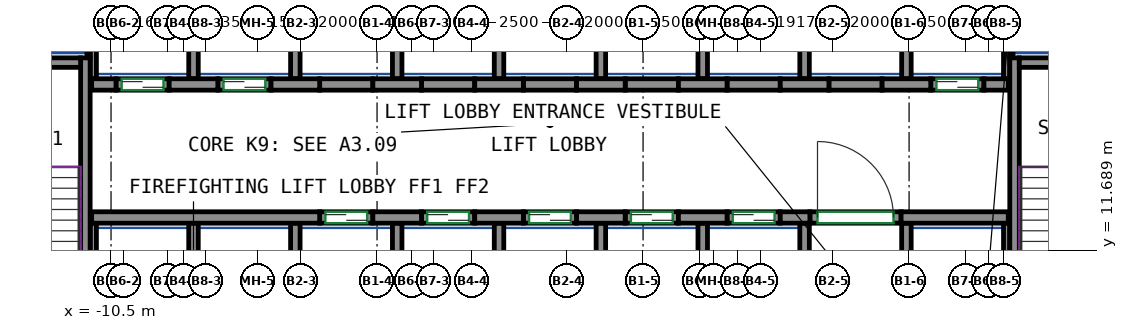
"""IFC4 building model, lengths in metres.
Left out: names, types, materials, properties, quantities, classifications, styles, units other than length and angle.
Written with IfcOpenShell. Run it as: python <this file> out.ifc"""

import sys

from ifc_helpers import new_model, si_unit, direction, frame, frame_2d, origin, place, context, subcontext, project, spatial, rectangle, extrude, source, transform, mapped, element, fill, save


model = new_model("IFC4")
c1 = context("Model", 3, precision=1e-05, world=origin(), true_north=direction((0.0, 1.0)))
c2 = subcontext(c1, "Body", "Model", "MODEL_VIEW")
j1 = project(units=[si_unit("LENGTHUNIT", "METRE"), si_unit("PLANEANGLEUNIT", "RADIAN")], contexts=[c1])
p1 = place(None, origin())
s1 = spatial("IfcSite", under=j1, at=p1, CompositionType="ELEMENT")
p2 = place(p1, origin())
s2 = spatial("IfcBuilding", under=s1, at=p2, CompositionType="ELEMENT")
p3 = place(p2, frame((0.0, 0.0, 39.0)))
s3 = spatial("IfcBuildingStorey", under=s2, at=p3, CompositionType="ELEMENT", Elevation=39.0)
m1 = source(origin(), c2, "Body", "SweptSolid", [
    extrude(rectangle(XDim=7.75, YDim=0.25, at=frame_2d((3.875, 0.0))), origin(), (0.0, 0.0, 1.0), 3.72),
])
p4 = place(p3, frame((-11.175, 9.0, 0.0), z_axis=(0.0, 0.0, 1.0), x_axis=(0.0, 1.0, 0.0)))
e1 = element("IfcWall", 1, at=p4, inside=s3, PredefinedType="SHEAR", context=c2, shape_type="MappedRepresentation", body=[
    mapped(m1, transform((0.0, 0.0, 0.0))),
])
m2 = source(origin(), c2, "Body", "SweptSolid", [
    extrude(rectangle(XDim=3.7, YDim=0.25, at=frame_2d((1.85, 0.0))), origin(), (0.0, 0.0, 1.0), 3.72),
])
p5 = place(p3, frame((-15.0, 16.625, 0.0), z_axis=(0.0, 0.0, 1.0), x_axis=(1.0, 0.0, 0.0)))
e2 = element("IfcWall", 2, at=p5, inside=s3, PredefinedType="SHEAR", context=c2, shape_type="MappedRepresentation", body=[
    mapped(m2, transform((0.0, 0.0, 0.0))),
])
p6 = place(p3, frame((13.275, 9.0, 0.0), z_axis=(0.0, 0.0, 1.0), x_axis=(0.0, 1.0, 0.0)))
e3 = element("IfcWall", 3, at=p6, inside=s3, PredefinedType="SHEAR", context=c2, shape_type="MappedRepresentation", body=[
    mapped(m1, transform((0.0, 0.0, 0.0))),
])
m3 = source(origin(), c2, "Body", "SweptSolid", [
    extrude(rectangle(XDim=3.7, YDim=0.25, at=frame_2d((1.85, 0.0))), origin(), (0.0, 0.0, 1.0), 3.72),
])
p7 = place(p3, frame((13.4, 16.625, 0.0), z_axis=(0.0, 0.0, 1.0), x_axis=(1.0, 0.0, 0.0)))
e4 = element("IfcWall", 4, at=p7, inside=s3, PredefinedType="SHEAR", context=c2, shape_type="MappedRepresentation", body=[
    mapped(m3, transform((0.0, 0.0, 0.0))),
])
m4 = source(origin(), c2, "Body", "SweptSolid", [
    extrude(rectangle(XDim=6.0, YDim=0.3, at=frame_2d((3.0, 0.0))), origin(), (0.0, 0.0, 1.0), 3.72),
])
p8 = place(p3, frame((-11.01, 12.55, 0.0), z_axis=(0.0, 0.0, 1.0), x_axis=(1.0, 0.0, 0.0)))
e5 = element("IfcWall", 5, at=p8, inside=s3, PredefinedType="SHEAR", context=c2, shape_type="MappedRepresentation", body=[
    mapped(m4, transform((0.0, 0.0, 0.0))),
])
m5 = source(origin(), c2, "Body", "SweptSolid", [
    extrude(rectangle(XDim=1.28, YDim=0.3, at=frame_2d((0.64, 0.0))), origin(), (0.0, 0.0, 1.0), 3.72),
])
for number, where, z_axis, x_axis in (
    (6, (-3.61, 12.55, 0.0), (0.0, 0.0, 1.0), (1.0, 0.0, 0.0)),
    (7, (-0.93, 12.55, 0.0), (0.0, 0.0, 1.0), (1.0, 0.0, 0.0)),
    (8, (1.75, 12.55, 0.0), (0.0, 0.0, 1.0), (1.0, 0.0, 0.0)),
    (9, (4.43, 12.55, 0.0), (0.0, 0.0, 1.0), (1.0, 0.0, 0.0)),
):
    element("IfcWall", number, at=place(p3, frame(where, z_axis=z_axis, x_axis=x_axis)), inside=s3, PredefinedType="SHEAR", context=c2, shape_type="MappedRepresentation", body=[
        mapped(m5, transform((0.0, 0.0, 0.0))),
    ])
m6 = source(origin(), c2, "Body", "SweptSolid", [
    extrude(rectangle(XDim=0.78, YDim=0.3, at=frame_2d((0.39, 0.0))), origin(), (0.0, 0.0, 1.0), 3.72),
])
p9 = place(p3, frame((7.11, 12.55, 0.0), z_axis=(0.0, 0.0, 1.0), x_axis=(1.0, 0.0, 0.0)))
e10 = element("IfcWall", 10, at=p9, inside=s3, PredefinedType="SHEAR", context=c2, shape_type="MappedRepresentation", body=[
    mapped(m6, transform((0.0, 0.0, 0.0))),
])
m7 = source(origin(), c2, "Body", "SweptSolid", [
    extrude(rectangle(XDim=2.82, YDim=0.3, at=frame_2d((1.41, 0.0))), origin(), (0.0, 0.0, 1.0), 3.72),
])
p10 = place(p3, frame((10.29, 12.55, 0.0), z_axis=(0.0, 0.0, 1.0), x_axis=(1.0, 0.0, 0.0)))
e11 = element("IfcWall", 11, at=p10, inside=s3, PredefinedType="SHEAR", context=c2, shape_type="MappedRepresentation", body=[
    mapped(m7, transform((0.0, 0.0, 0.0))),
])
m8 = source(origin(), c2, "Body", "SweptSolid", [
    extrude(rectangle(XDim=0.64, YDim=0.3, at=frame_2d((0.32, 0.0))), origin(), (0.0, 0.0, 1.0), 3.72),
])
p11 = place(p3, frame((-11.01, 16.05, 0.0), z_axis=(0.0, 0.0, 1.0), x_axis=(1.0, 0.0, 0.0)))
e12 = element("IfcWall", 12, at=p11, inside=s3, PredefinedType="SHEAR", context=c2, shape_type="MappedRepresentation", body=[
    mapped(m8, transform((0.0, 0.0, 0.0))),
])
for number, where, z_axis, x_axis in (
    (13, (-8.97, 16.05, 0.0), (0.0, 0.0, 1.0), (1.0, 0.0, 0.0)),
    (14, (-6.29, 16.05, 0.0), (0.0, 0.0, 1.0), (1.0, 0.0, 0.0)),
    (15, (-3.61, 16.05, 0.0), (0.0, 0.0, 1.0), (1.0, 0.0, 0.0)),
    (16, (-0.93, 16.05, 0.0), (0.0, 0.0, 1.0), (1.0, 0.0, 0.0)),
    (17, (1.75, 16.05, 0.0), (0.0, 0.0, 1.0), (1.0, 0.0, 0.0)),
    (18, (4.43, 16.05, 0.0), (0.0, 0.0, 1.0), (1.0, 0.0, 0.0)),
):
    element("IfcWall", number, at=place(p3, frame(where, z_axis=z_axis, x_axis=x_axis)), inside=s3, PredefinedType="SHEAR", context=c2, shape_type="MappedRepresentation", body=[
        mapped(m5, transform((0.0, 0.0, 0.0))),
    ])
m9 = source(origin(), c2, "Body", "SweptSolid", [
    extrude(rectangle(XDim=1.28, YDim=0.3, at=frame_2d((0.64, 0.0))), origin(), (0.0, 0.0, 1.0), 3.72),
])
p12 = place(p3, frame((7.11, 16.05, 0.0), z_axis=(0.0, 0.0, 1.0), x_axis=(1.0, 0.0, 0.0)))
e19 = element("IfcWall", 19, at=p12, inside=s3, PredefinedType="SHEAR", context=c2, shape_type="MappedRepresentation", body=[
    mapped(m9, transform((0.0, 0.0, 0.0))),
])
p13 = place(p3, frame((9.79, 16.05, 0.0), z_axis=(0.0, 0.0, 1.0), x_axis=(1.0, 0.0, 0.0)))
e20 = element("IfcWall", 20, at=p13, inside=s3, PredefinedType="SHEAR", context=c2, shape_type="MappedRepresentation", body=[
    mapped(m5, transform((0.0, 0.0, 0.0))),
])
m10 = source(origin(), c2, "Body", "SweptSolid", [
    extrude(rectangle(XDim=0.64, YDim=0.3, at=frame_2d((0.32, 0.0))), origin(), (0.0, 0.0, 1.0), 3.72),
])
p14 = place(p3, frame((12.47, 16.05, 0.0), z_axis=(0.0, 0.0, 1.0), x_axis=(1.0, 0.0, 0.0)))
e21 = element("IfcWall", 21, at=p14, inside=s3, PredefinedType="SHEAR", context=c2, shape_type="MappedRepresentation", body=[
    mapped(m10, transform((0.0, 0.0, 0.0))),
])
m11 = source(origin(), c2, "Body", "SweptSolid", [
    extrude(rectangle(XDim=1.4, YDim=0.3, at=frame_2d((0.7, 0.0))), origin(), (0.0, 0.0, 1.0), 3.72),
])
p15 = place(p3, frame((-5.01, 12.55, 0.0), z_axis=(0.0, 0.0, 1.0), x_axis=(1.0, 0.0, 0.0)))
e22 = element("IfcWall", 22, at=p15, inside=s3, PredefinedType="PARTITIONING", context=c2, shape_type="MappedRepresentation", body=[
    mapped(m11, transform((0.0, 0.0, 0.0))),
])
p16 = place(p15, frame((0.15, 0.0, 0.0)))
e23 = element("IfcOpeningElement", 23, at=p16, cuts=e22, PredefinedType="OPENING", context=c2, shape_type="SweptSolid", body=[
    extrude(rectangle(XDim=1.1, YDim=2.1, at=frame_2d((0.55, 1.05))), frame((0.0, 0.16, 0.0), z_axis=(0.0, -1.0, 0.0), x_axis=(1.0, 0.0, 0.0)), (0.0, 0.0, 1.0), 0.32),
])
m12 = source(origin(), c2, "Body", "SweptSolid", [
    extrude(rectangle(XDim=1.4, YDim=0.3, at=frame_2d((0.7, 0.0))), origin(), (0.0, 0.0, 1.0), 3.72),
])
p17 = place(p3, frame((-2.33, 12.55, 0.0), z_axis=(0.0, 0.0, 1.0), x_axis=(1.0, 0.0, 0.0)))
e24 = element("IfcWall", 24, at=p17, inside=s3, PredefinedType="PARTITIONING", context=c2, shape_type="MappedRepresentation", body=[
    mapped(m12, transform((0.0, 0.0, 0.0))),
])
p18 = place(p17, frame((0.15, 0.0, 0.0)))
e25 = element("IfcOpeningElement", 25, at=p18, cuts=e24, PredefinedType="OPENING", context=c2, shape_type="SweptSolid", body=[
    extrude(rectangle(XDim=1.1, YDim=2.1, at=frame_2d((0.55, 1.05))), frame((0.0, 0.16, 0.0), z_axis=(0.0, -1.0, 0.0), x_axis=(1.0, 0.0, 0.0)), (0.0, 0.0, 1.0), 0.32),
])
p19 = place(p3, frame((0.35, 12.55, 0.0), z_axis=(0.0, 0.0, 1.0), x_axis=(1.0, 0.0, 0.0)))
e26 = element("IfcWall", 26, at=p19, inside=s3, PredefinedType="PARTITIONING", context=c2, shape_type="MappedRepresentation", body=[
    mapped(m11, transform((0.0, 0.0, 0.0))),
])
p20 = place(p19, frame((0.15, 0.0, 0.0)))
e27 = element("IfcOpeningElement", 27, at=p20, cuts=e26, PredefinedType="OPENING", context=c2, shape_type="SweptSolid", body=[
    extrude(rectangle(XDim=1.1, YDim=2.1, at=frame_2d((0.55, 1.05))), frame((0.0, 0.16, 0.0), z_axis=(0.0, -1.0, 0.0), x_axis=(1.0, 0.0, 0.0)), (0.0, 0.0, 1.0), 0.32),
])
p21 = place(p3, frame((3.03, 12.55, 0.0), z_axis=(0.0, 0.0, 1.0), x_axis=(1.0, 0.0, 0.0)))
e28 = element("IfcWall", 28, at=p21, inside=s3, PredefinedType="PARTITIONING", context=c2, shape_type="MappedRepresentation", body=[
    mapped(m11, transform((0.0, 0.0, 0.0))),
])
p22 = place(p21, frame((0.15, 0.0, 0.0)))
e29 = element("IfcOpeningElement", 29, at=p22, cuts=e28, PredefinedType="OPENING", context=c2, shape_type="SweptSolid", body=[
    extrude(rectangle(XDim=1.1, YDim=2.1, at=frame_2d((0.55, 1.05))), frame((0.0, 0.16, 0.0), z_axis=(0.0, -1.0, 0.0), x_axis=(1.0, 0.0, 0.0)), (0.0, 0.0, 1.0), 0.32),
])
p23 = place(p3, frame((5.71, 12.55, 0.0), z_axis=(0.0, 0.0, 1.0), x_axis=(1.0, 0.0, 0.0)))
e30 = element("IfcWall", 30, at=p23, inside=s3, PredefinedType="PARTITIONING", context=c2, shape_type="MappedRepresentation", body=[
    mapped(m12, transform((0.0, 0.0, 0.0))),
])
p24 = place(p23, frame((0.15, 0.0, 0.0)))
e31 = element("IfcOpeningElement", 31, at=p24, cuts=e30, PredefinedType="OPENING", context=c2, shape_type="SweptSolid", body=[
    extrude(rectangle(XDim=1.1, YDim=2.1, at=frame_2d((0.55, 1.05))), frame((0.0, 0.16, 0.0), z_axis=(0.0, -1.0, 0.0), x_axis=(1.0, 0.0, 0.0)), (0.0, 0.0, 1.0), 0.32),
])
p25 = place(p3, frame((11.07, 16.05, 0.0), z_axis=(0.0, 0.0, 1.0), x_axis=(1.0, 0.0, 0.0)))
e32 = element("IfcWall", 32, at=p25, inside=s3, PredefinedType="PARTITIONING", context=c2, shape_type="MappedRepresentation", body=[
    mapped(m11, transform((0.0, 0.0, 0.0))),
])
p26 = place(p25, frame((0.15, 0.0, 0.0)))
e33 = element("IfcOpeningElement", 33, at=p26, cuts=e32, PredefinedType="OPENING", context=c2, shape_type="SweptSolid", body=[
    extrude(rectangle(XDim=1.1, YDim=2.1, at=frame_2d((0.55, 1.05))), frame((0.0, 0.16, 0.0), z_axis=(0.0, -1.0, 0.0), x_axis=(1.0, 0.0, 0.0)), (0.0, 0.0, 1.0), 0.32),
])
p27 = place(p3, frame((-10.37, 16.05, 0.0), z_axis=(0.0, 0.0, 1.0), x_axis=(1.0, 0.0, 0.0)))
e34 = element("IfcWall", 34, at=p27, inside=s3, PredefinedType="PARTITIONING", context=c2, shape_type="MappedRepresentation", body=[
    mapped(m12, transform((0.0, 0.0, 0.0))),
])
p28 = place(p27, frame((0.15, 0.0, 0.0)))
e35 = element("IfcOpeningElement", 35, at=p28, cuts=e34, PredefinedType="OPENING", context=c2, shape_type="SweptSolid", body=[
    extrude(rectangle(XDim=1.1, YDim=2.1, at=frame_2d((0.55, 1.05))), frame((0.0, 0.16, 0.0), z_axis=(0.0, -1.0, 0.0), x_axis=(1.0, 0.0, 0.0)), (0.0, 0.0, 1.0), 0.32),
])
p29 = place(p3, frame((-7.69, 16.05, 0.0), z_axis=(0.0, 0.0, 1.0), x_axis=(1.0, 0.0, 0.0)))
e36 = element("IfcWall", 36, at=p29, inside=s3, PredefinedType="PARTITIONING", context=c2, shape_type="MappedRepresentation", body=[
    mapped(m11, transform((0.0, 0.0, 0.0))),
])
p30 = place(p29, frame((0.15, 0.0, 0.0)))
e37 = element("IfcOpeningElement", 37, at=p30, cuts=e36, PredefinedType="OPENING", context=c2, shape_type="SweptSolid", body=[
    extrude(rectangle(XDim=1.1, YDim=2.1, at=frame_2d((0.55, 1.05))), frame((0.0, 0.16, 0.0), z_axis=(0.0, -1.0, 0.0), x_axis=(1.0, 0.0, 0.0)), (0.0, 0.0, 1.0), 0.32),
])
m13 = source(origin(), c2, "Body", "SweptSolid", [
    extrude(rectangle(XDim=2.4, YDim=0.3, at=frame_2d((1.2, 0.0))), origin(), (0.0, 0.0, 1.0), 3.72),
])
p31 = place(p3, frame((7.89, 12.55, 0.0), z_axis=(0.0, 0.0, 1.0), x_axis=(1.0, 0.0, 0.0)))
e38 = element("IfcWall", 38, at=p31, inside=s3, PredefinedType="PARTITIONING", context=c2, shape_type="MappedRepresentation", body=[
    mapped(m13, transform((0.0, 0.0, 0.0))),
])
p32 = place(p31, frame((0.2, 0.0, 0.0)))
e39 = element("IfcOpeningElement", 39, at=p32, cuts=e38, PredefinedType="OPENING", context=c2, shape_type="SweptSolid", body=[
    extrude(rectangle(XDim=2.0, YDim=2.1, at=frame_2d((1.0, 1.05))), frame((0.0, 0.16, 0.0), z_axis=(0.0, -1.0, 0.0), x_axis=(1.0, 0.0, 0.0)), (0.0, 0.0, 1.0), 0.32),
])
p33 = place(p3, frame((-5.01, 16.05, 0.0), z_axis=(0.0, 0.0, 1.0), x_axis=(1.0, 0.0, 0.0)))
e40 = element("IfcWall", 40, at=p33, inside=s3, PredefinedType="PARTITIONING", context=c2, shape_type="MappedRepresentation", body=[
    mapped(m11, transform((0.0, 0.0, 0.0))),
])
p34 = place(p3, frame((-2.33, 16.05, 0.0), z_axis=(0.0, 0.0, 1.0), x_axis=(1.0, 0.0, 0.0)))
e41 = element("IfcWall", 41, at=p34, inside=s3, PredefinedType="PARTITIONING", context=c2, shape_type="MappedRepresentation", body=[
    mapped(m12, transform((0.0, 0.0, 0.0))),
])
for number, where, z_axis, x_axis in (
    (42, (0.35, 16.05, 0.0), (0.0, 0.0, 1.0), (1.0, 0.0, 0.0)),
    (43, (3.03, 16.05, 0.0), (0.0, 0.0, 1.0), (1.0, 0.0, 0.0)),
):
    element("IfcWall", number, at=place(p3, frame(where, z_axis=z_axis, x_axis=x_axis)), inside=s3, PredefinedType="PARTITIONING", context=c2, shape_type="MappedRepresentation", body=[
        mapped(m11, transform((0.0, 0.0, 0.0))),
    ])
for number, where, z_axis, x_axis in (
    (44, (5.71, 16.05, 0.0), (0.0, 0.0, 1.0), (1.0, 0.0, 0.0)),
    (45, (8.39, 16.05, 0.0), (0.0, 0.0, 1.0), (1.0, 0.0, 0.0)),
):
    element("IfcWall", number, at=place(p3, frame(where, z_axis=z_axis, x_axis=x_axis)), inside=s3, PredefinedType="PARTITIONING", context=c2, shape_type="MappedRepresentation", body=[
        mapped(m12, transform((0.0, 0.0, 0.0))),
    ])
m14 = source(origin(), c2, "Body", "SweptSolid", [
    extrude(rectangle(XDim=3.275, YDim=0.165, at=frame_2d((1.638, 0.0))), origin(), (0.0, 0.0, 1.0), 3.72),
])
for number, where, z_axis, x_axis in (
    (46, (13.067, 16.2, 0.0), (0.0, 0.0, 1.0), (0.0, 1.0, 0.0)),
    (47, (-10.968, 16.2, 0.0), (0.0, 0.0, 1.0), (0.0, 1.0, 0.0)),
):
    element("IfcWall", number, at=place(p3, frame(where, z_axis=z_axis, x_axis=x_axis)), inside=s3, PredefinedType="PARTITIONING", context=c2, shape_type="MappedRepresentation", body=[
        mapped(m14, transform((0.0, 0.0, 0.0))),
    ])
m15 = source(origin(), c2, "Body", "SweptSolid", [
    extrude(rectangle(XDim=3.275, YDim=0.25, at=frame_2d((1.638, 0.0))), origin(), (0.0, 0.0, 1.0), 3.72),
])
p35 = place(p3, frame((10.43, 16.2, 0.0), z_axis=(0.0, 0.0, 1.0), x_axis=(0.0, 1.0, 0.0)))
e48 = element("IfcWall", 48, at=p35, inside=s3, PredefinedType="PARTITIONING", context=c2, shape_type="MappedRepresentation", body=[
    mapped(m15, transform((0.0, 0.0, 0.0))),
])
m16 = source(origin(), c2, "Body", "SweptSolid", [
    extrude(rectangle(XDim=2.725, YDim=0.085, at=frame_2d((1.363, 0.0))), origin(), (0.0, 0.0, 1.0), 3.72),
])
p36 = place(p3, frame((13.192, 16.75, 0.0), z_axis=(0.0, 0.0, 1.0), x_axis=(0.0, 1.0, 0.0)))
e49 = element("IfcWall", 49, at=p36, inside=s3, PredefinedType="PARTITIONING", context=c2, shape_type="MappedRepresentation", body=[
    mapped(m16, transform((0.0, 0.0, 0.0))),
])
for number, where, z_axis, x_axis in (
    (50, (2.39, 16.2, 0.0), (0.0, 0.0, 1.0), (0.0, 1.0, 0.0)),
    (51, (5.07, 16.2, 0.0), (0.0, 0.0, 1.0), (0.0, 1.0, 0.0)),
    (52, (7.75, 16.2, 0.0), (0.0, 0.0, 1.0), (0.0, 1.0, 0.0)),
    (53, (-0.29, 16.2, 0.0), (0.0, 0.0, 1.0), (0.0, 1.0, 0.0)),
):
    element("IfcWall", number, at=place(p3, frame(where, z_axis=z_axis, x_axis=x_axis)), inside=s3, PredefinedType="PARTITIONING", context=c2, shape_type="MappedRepresentation", body=[
        mapped(m15, transform((0.0, 0.0, 0.0))),
    ])
p37 = place(p3, frame((-11.093, 16.75, 0.0), z_axis=(0.0, 0.0, 1.0), x_axis=(0.0, 1.0, 0.0)))
e54 = element("IfcWall", 54, at=p37, inside=s3, PredefinedType="PARTITIONING", context=c2, shape_type="MappedRepresentation", body=[
    mapped(m16, transform((0.0, 0.0, 0.0))),
])
for number, where, z_axis, x_axis in (
    (55, (-2.97, 16.2, 0.0), (0.0, 0.0, 1.0), (0.0, 1.0, 0.0)),
    (56, (-5.65, 16.2, 0.0), (0.0, 0.0, 1.0), (0.0, 1.0, 0.0)),
    (57, (-8.33, 16.2, 0.0), (0.0, 0.0, 1.0), (0.0, 1.0, 0.0)),
):
    element("IfcWall", number, at=place(p3, frame(where, z_axis=z_axis, x_axis=x_axis)), inside=s3, PredefinedType="PARTITIONING", context=c2, shape_type="MappedRepresentation", body=[
        mapped(m15, transform((0.0, 0.0, 0.0))),
    ])
m17 = source(origin(), c2, "Body", "SweptSolid", [
    extrude(rectangle(XDim=3.4, YDim=0.25, at=frame_2d((1.7, 0.0))), origin(), (0.0, 0.0, 1.0), 3.72),
])
p38 = place(p3, frame((10.43, 9.0, 0.0), z_axis=(0.0, 0.0, 1.0), x_axis=(0.0, 1.0, 0.0)))
e58 = element("IfcWall", 58, at=p38, inside=s3, PredefinedType="PARTITIONING", context=c2, shape_type="MappedRepresentation", body=[
    mapped(m17, transform((0.0, 0.0, 0.0))),
])
m18 = source(origin(), c2, "Body", "SweptSolid", [
    extrude(rectangle(XDim=3.4, YDim=0.165, at=frame_2d((1.7, 0.0))), origin(), (0.0, 0.0, 1.0), 3.72),
])
p39 = place(p3, frame((13.067, 9.0, 0.0), z_axis=(0.0, 0.0, 1.0), x_axis=(0.0, 1.0, 0.0)))
e59 = element("IfcWall", 59, at=p39, inside=s3, PredefinedType="PARTITIONING", context=c2, shape_type="MappedRepresentation", body=[
    mapped(m18, transform((0.0, 0.0, 0.0))),
])
for number, where, z_axis, x_axis in (
    (60, (2.39, 9.0, 0.0), (0.0, 0.0, 1.0), (0.0, 1.0, 0.0)),
    (61, (5.07, 9.0, 0.0), (0.0, 0.0, 1.0), (0.0, 1.0, 0.0)),
    (62, (7.75, 9.0, 0.0), (0.0, 0.0, 1.0), (0.0, 1.0, 0.0)),
    (63, (-0.29, 9.0, 0.0), (0.0, 0.0, 1.0), (0.0, 1.0, 0.0)),
):
    element("IfcWall", number, at=place(p3, frame(where, z_axis=z_axis, x_axis=x_axis)), inside=s3, PredefinedType="PARTITIONING", context=c2, shape_type="MappedRepresentation", body=[
        mapped(m17, transform((0.0, 0.0, 0.0))),
    ])
p40 = place(p3, frame((-10.968, 9.0, 0.0), z_axis=(0.0, 0.0, 1.0), x_axis=(0.0, 1.0, 0.0)))
e64 = element("IfcWall", 64, at=p40, inside=s3, PredefinedType="PARTITIONING", context=c2, shape_type="MappedRepresentation", body=[
    mapped(m18, transform((0.0, 0.0, 0.0))),
])
for number, where, z_axis, x_axis in (
    (65, (-2.97, 9.0, 0.0), (0.0, 0.0, 1.0), (0.0, 1.0, 0.0)),
    (66, (-5.65, 9.0, 0.0), (0.0, 0.0, 1.0), (0.0, 1.0, 0.0)),
    (67, (-8.33, 9.0, 0.0), (0.0, 0.0, 1.0), (0.0, 1.0, 0.0)),
):
    element("IfcWall", number, at=place(p3, frame(where, z_axis=z_axis, x_axis=x_axis)), inside=s3, PredefinedType="PARTITIONING", context=c2, shape_type="MappedRepresentation", body=[
        mapped(m17, transform((0.0, 0.0, 0.0))),
    ])
p41 = place(p32, origin())
e68 = element("IfcDoor", 68, at=p41, inside=s3, OperationType="DOUBLE_DOOR_SINGLE_SWING", PredefinedType="DOOR", context=c2, shape_type="SweptSolid", body=[
    extrude(rectangle(XDim=2.0, YDim=2.1, at=frame_2d((1.0, 1.05))), frame((0.0, 0.025, 0.0), z_axis=(0.0, -1.0, 0.0), x_axis=(1.0, 0.0, 0.0)), (0.0, 0.0, 1.0), 0.05),
])
fill(e39, e68)
p42 = place(p16, origin())
e69 = element("IfcDoor", 69, at=p42, inside=s3, OperationType="DOUBLE_DOOR_SLIDING", PredefinedType="DOOR", context=c2, shape_type="SweptSolid", body=[
    extrude(rectangle(XDim=1.1, YDim=2.1, at=frame_2d((0.55, 1.05))), frame((0.0, 0.025, 0.0), z_axis=(0.0, -1.0, 0.0), x_axis=(1.0, 0.0, 0.0)), (0.0, 0.0, 1.0), 0.05),
])
fill(e23, e69)
p43 = place(p18, origin())
e70 = element("IfcDoor", 70, at=p43, inside=s3, OperationType="DOUBLE_DOOR_SLIDING", PredefinedType="DOOR", context=c2, shape_type="SweptSolid", body=[
    extrude(rectangle(XDim=1.1, YDim=2.1, at=frame_2d((0.55, 1.05))), frame((0.0, 0.025, 0.0), z_axis=(0.0, -1.0, 0.0), x_axis=(1.0, 0.0, 0.0)), (0.0, 0.0, 1.0), 0.05),
])
fill(e25, e70)
p44 = place(p20, origin())
e71 = element("IfcDoor", 71, at=p44, inside=s3, OperationType="DOUBLE_DOOR_SLIDING", PredefinedType="DOOR", context=c2, shape_type="SweptSolid", body=[
    extrude(rectangle(XDim=1.1, YDim=2.1, at=frame_2d((0.55, 1.05))), frame((0.0, 0.025, 0.0), z_axis=(0.0, -1.0, 0.0), x_axis=(1.0, 0.0, 0.0)), (0.0, 0.0, 1.0), 0.05),
])
fill(e27, e71)
p45 = place(p22, origin())
e72 = element("IfcDoor", 72, at=p45, inside=s3, OperationType="DOUBLE_DOOR_SLIDING", PredefinedType="DOOR", context=c2, shape_type="SweptSolid", body=[
    extrude(rectangle(XDim=1.1, YDim=2.1, at=frame_2d((0.55, 1.05))), frame((0.0, 0.025, 0.0), z_axis=(0.0, -1.0, 0.0), x_axis=(1.0, 0.0, 0.0)), (0.0, 0.0, 1.0), 0.05),
])
fill(e29, e72)
p46 = place(p24, origin())
e73 = element("IfcDoor", 73, at=p46, inside=s3, OperationType="DOUBLE_DOOR_SLIDING", PredefinedType="DOOR", context=c2, shape_type="SweptSolid", body=[
    extrude(rectangle(XDim=1.1, YDim=2.1, at=frame_2d((0.55, 1.05))), frame((0.0, 0.025, 0.0), z_axis=(0.0, -1.0, 0.0), x_axis=(1.0, 0.0, 0.0)), (0.0, 0.0, 1.0), 0.05),
])
fill(e31, e73)
p47 = place(p26, origin())
e74 = element("IfcDoor", 74, at=p47, inside=s3, OperationType="DOUBLE_DOOR_SLIDING", PredefinedType="DOOR", context=c2, shape_type="SweptSolid", body=[
    extrude(rectangle(XDim=1.1, YDim=2.1, at=frame_2d((0.55, 1.05))), frame((0.0, 0.025, 0.0), z_axis=(0.0, -1.0, 0.0), x_axis=(1.0, 0.0, 0.0)), (0.0, 0.0, 1.0), 0.05),
])
fill(e33, e74)
p48 = place(p28, origin())
e75 = element("IfcDoor", 75, at=p48, inside=s3, OperationType="DOUBLE_DOOR_SLIDING", PredefinedType="DOOR", context=c2, shape_type="SweptSolid", body=[
    extrude(rectangle(XDim=1.1, YDim=2.1, at=frame_2d((0.55, 1.05))), frame((0.0, 0.025, 0.0), z_axis=(0.0, -1.0, 0.0), x_axis=(1.0, 0.0, 0.0)), (0.0, 0.0, 1.0), 0.05),
])
fill(e35, e75)
p49 = place(p30, origin())
e76 = element("IfcDoor", 76, at=p49, inside=s3, OperationType="DOUBLE_DOOR_SLIDING", PredefinedType="DOOR", context=c2, shape_type="SweptSolid", body=[
    extrude(rectangle(XDim=1.1, YDim=2.1, at=frame_2d((0.55, 1.05))), frame((0.0, 0.025, 0.0), z_axis=(0.0, -1.0, 0.0), x_axis=(1.0, 0.0, 0.0)), (0.0, 0.0, 1.0), 0.05),
])
fill(e37, e76)
save(model, sys.argv[1])
